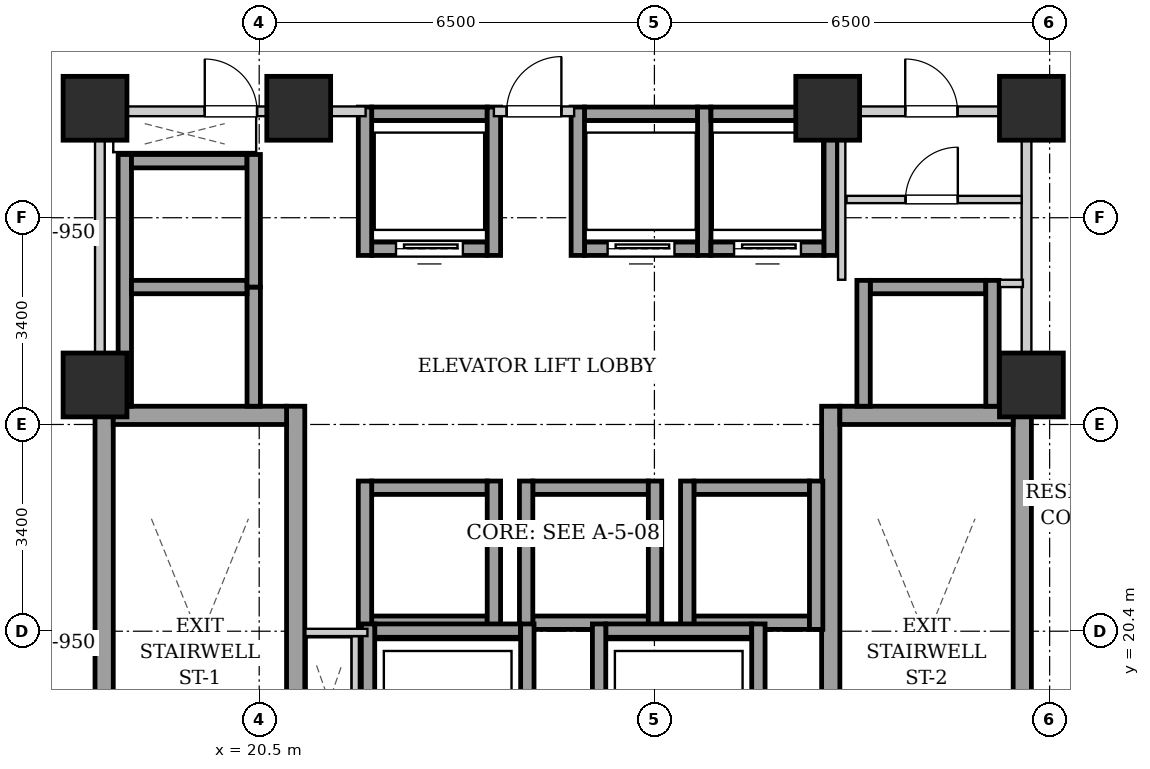
"""IFC4 building model, lengths in metres.
Left out: names, types, materials, properties, quantities, classifications, styles, units other than length and angle.
Written with IfcOpenShell. Run it as: python <this file> out.ifc"""

import sys

from ifc_helpers import new_model, si_unit, direction, frame, frame_2d, origin, origin_2d, place, context, subcontext, project, spatial, rectangle, extrude, element, fill, save


model = new_model("IFC4")
c1 = context("Model", 3, precision=1e-05, world=origin(), true_north=direction((0.0, 1.0)))
c2 = subcontext(c1, "Body", "Model", "MODEL_VIEW")
j1 = project(units=[si_unit("LENGTHUNIT", "METRE"), si_unit("PLANEANGLEUNIT", "RADIAN")], contexts=[c1])
p1 = place(None, origin())
s1 = spatial("IfcSite", under=j1, at=p1, CompositionType="ELEMENT")
p2 = place(p1, origin())
s2 = spatial("IfcBuilding", under=s1, at=p2, CompositionType="ELEMENT")
p3 = place(p2, frame((0.0, 0.0, 100.7)))
s3 = spatial("IfcBuildingStorey", under=s2, at=p3, CompositionType="ELEMENT", Elevation=100.7)
for number, where, z_axis, x_axis in (
    (1, (17.8, 29.0, 0.0), (0.0, 0.0, 1.0), (1.0, 0.0, 0.0)),
    (2, (21.15, 29.0, 0.0), (0.0, 0.0, 1.0), (1.0, 0.0, 0.0)),
    (3, (29.85, 29.0, 0.0), (0.0, 0.0, 1.0), (1.0, 0.0, 0.0)),
    (4, (33.2, 29.0, 0.0), (0.0, 0.0, 1.0), (1.0, 0.0, 0.0)),
    (5, (17.8, 24.45, 0.0), (0.0, 0.0, 1.0), (1.0, 0.0, 0.0)),
    (6, (33.2, 24.45, 0.0), (0.0, 0.0, 1.0), (1.0, 0.0, 0.0)),
):
    element("IfcColumn", number, at=place(p3, frame(where, z_axis=z_axis, x_axis=x_axis)), inside=s3, PredefinedType="COLUMN", context=c2, shape_type="SweptSolid", body=[
        extrude(rectangle(XDim=1.05, YDim=1.05, at=origin_2d()), origin(), (0.0, 0.0, 1.0), 3.2),
    ])
for number, where, z_axis, x_axis in (
    (7, (17.95, 15.1, 0.0), (0.0, 0.0, 1.0), (0.0, 1.0, 0.0)),
    (8, (21.1, 15.1, 0.0), (0.0, 0.0, 1.0), (0.0, 1.0, 0.0)),
):
    element("IfcWall", number, at=place(p3, frame(where, z_axis=z_axis, x_axis=x_axis)), inside=s3, PredefinedType="SHEAR", context=c2, shape_type="SweptSolid", body=[
        extrude(rectangle(XDim=9.0, YDim=0.3, at=frame_2d((4.5, 0.0))), origin(), (0.0, 0.0, 1.0), 2.94),
    ])
p4 = place(p3, frame((18.1, 23.95, 0.0), z_axis=(0.0, 0.0, 1.0), x_axis=(1.0, 0.0, 0.0)))
e9 = element("IfcWall", 9, at=p4, inside=s3, PredefinedType="SHEAR", context=c2, shape_type="SweptSolid", body=[
    extrude(rectangle(XDim=2.85, YDim=0.3, at=frame_2d((1.425, 0.0))), origin(), (0.0, 0.0, 1.0), 2.94),
])
for number, where, z_axis, x_axis in (
    (10, (29.9, 15.1, 0.0), (0.0, 0.0, 1.0), (0.0, 1.0, 0.0)),
    (11, (33.05, 15.1, 0.0), (0.0, 0.0, 1.0), (0.0, 1.0, 0.0)),
):
    element("IfcWall", number, at=place(p3, frame(where, z_axis=z_axis, x_axis=x_axis)), inside=s3, PredefinedType="SHEAR", context=c2, shape_type="SweptSolid", body=[
        extrude(rectangle(XDim=9.0, YDim=0.3, at=frame_2d((4.5, 0.0))), origin(), (0.0, 0.0, 1.0), 2.94),
    ])
p5 = place(p3, frame((30.05, 23.95, 0.0), z_axis=(0.0, 0.0, 1.0), x_axis=(1.0, 0.0, 0.0)))
e12 = element("IfcWall", 12, at=p5, inside=s3, PredefinedType="SHEAR", context=c2, shape_type="SweptSolid", body=[
    extrude(rectangle(XDim=2.85, YDim=0.3, at=frame_2d((1.425, 0.0))), origin(), (0.0, 0.0, 1.0), 2.94),
])
p6 = place(p3, frame((22.35, 26.69, 0.0), z_axis=(0.0, 0.0, 1.0), x_axis=(1.0, 0.0, 0.0)))
e13 = element("IfcWall", 13, at=p6, inside=s3, PredefinedType="SHEAR", context=c2, shape_type="SweptSolid", body=[
    extrude(rectangle(XDim=1.9, YDim=0.22, at=frame_2d((0.95, 0.0))), origin(), (0.0, 0.0, 1.0), 2.94),
])
p7 = place(p6, frame((0.4, 0.0, 0.0)))
e14 = element("IfcOpeningElement", 14, at=p7, cuts=e13, PredefinedType="OPENING", context=c2, shape_type="SweptSolid", body=[
    extrude(rectangle(XDim=1.1, YDim=2.15, at=frame_2d((0.55, 1.075))), frame((0.0, 0.12, 0.0), z_axis=(0.0, -1.0, 0.0), x_axis=(1.0, 0.0, 0.0)), (0.0, 0.0, 1.0), 0.24),
])
p8 = place(p3, frame((22.35, 28.91, 0.0), z_axis=(0.0, 0.0, 1.0), x_axis=(1.0, 0.0, 0.0)))
e15 = element("IfcWall", 15, at=p8, inside=s3, PredefinedType="SHEAR", context=c2, shape_type="SweptSolid", body=[
    extrude(rectangle(XDim=1.9, YDim=0.22, at=frame_2d((0.95, 0.0))), origin(), (0.0, 0.0, 1.0), 2.94),
])
for number, where, z_axis, x_axis in (
    (16, (22.24, 26.58, 0.0), (0.0, 0.0, 1.0), (0.0, 1.0, 0.0)),
    (17, (24.36, 26.58, 0.0), (0.0, 0.0, 1.0), (0.0, 1.0, 0.0)),
):
    element("IfcWall", number, at=place(p3, frame(where, z_axis=z_axis, x_axis=x_axis)), inside=s3, PredefinedType="SHEAR", context=c2, shape_type="SweptSolid", body=[
        extrude(rectangle(XDim=2.44, YDim=0.22, at=frame_2d((1.22, 0.0))), origin(), (0.0, 0.0, 1.0), 2.94),
    ])
p9 = place(p3, frame((25.85, 26.69, 0.0), z_axis=(0.0, 0.0, 1.0), x_axis=(1.0, 0.0, 0.0)))
e18 = element("IfcWall", 18, at=p9, inside=s3, PredefinedType="SHEAR", context=c2, shape_type="SweptSolid", body=[
    extrude(rectangle(XDim=1.86, YDim=0.22, at=frame_2d((0.93, 0.0))), origin(), (0.0, 0.0, 1.0), 2.94),
])
p10 = place(p9, frame((0.38, 0.0, 0.0)))
e19 = element("IfcOpeningElement", 19, at=p10, cuts=e18, PredefinedType="OPENING", context=c2, shape_type="SweptSolid", body=[
    extrude(rectangle(XDim=1.1, YDim=2.15, at=frame_2d((0.55, 1.075))), frame((0.0, 0.12, 0.0), z_axis=(0.0, -1.0, 0.0), x_axis=(1.0, 0.0, 0.0)), (0.0, 0.0, 1.0), 0.24),
])
p11 = place(p3, frame((25.85, 28.91, 0.0), z_axis=(0.0, 0.0, 1.0), x_axis=(1.0, 0.0, 0.0)))
e20 = element("IfcWall", 20, at=p11, inside=s3, PredefinedType="SHEAR", context=c2, shape_type="SweptSolid", body=[
    extrude(rectangle(XDim=1.86, YDim=0.22, at=frame_2d((0.93, 0.0))), origin(), (0.0, 0.0, 1.0), 2.94),
])
for number, where, z_axis, x_axis in (
    (21, (25.74, 26.58, 0.0), (0.0, 0.0, 1.0), (0.0, 1.0, 0.0)),
    (22, (27.82, 26.58, 0.0), (0.0, 0.0, 1.0), (0.0, 1.0, 0.0)),
):
    element("IfcWall", number, at=place(p3, frame(where, z_axis=z_axis, x_axis=x_axis)), inside=s3, PredefinedType="SHEAR", context=c2, shape_type="SweptSolid", body=[
        extrude(rectangle(XDim=2.44, YDim=0.22, at=frame_2d((1.22, 0.0))), origin(), (0.0, 0.0, 1.0), 2.94),
    ])
p12 = place(p3, frame((27.93, 26.69, 0.0), z_axis=(0.0, 0.0, 1.0), x_axis=(1.0, 0.0, 0.0)))
e23 = element("IfcWall", 23, at=p12, inside=s3, PredefinedType="SHEAR", context=c2, shape_type="SweptSolid", body=[
    extrude(rectangle(XDim=1.86, YDim=0.22, at=frame_2d((0.93, 0.0))), origin(), (0.0, 0.0, 1.0), 2.94),
])
p13 = place(p12, frame((0.38, 0.0, 0.0)))
e24 = element("IfcOpeningElement", 24, at=p13, cuts=e23, PredefinedType="OPENING", context=c2, shape_type="SweptSolid", body=[
    extrude(rectangle(XDim=1.1, YDim=2.15, at=frame_2d((0.55, 1.075))), frame((0.0, 0.12, 0.0), z_axis=(0.0, -1.0, 0.0), x_axis=(1.0, 0.0, 0.0)), (0.0, 0.0, 1.0), 0.24),
])
p14 = place(p3, frame((27.93, 28.91, 0.0), z_axis=(0.0, 0.0, 1.0), x_axis=(1.0, 0.0, 0.0)))
e25 = element("IfcWall", 25, at=p14, inside=s3, PredefinedType="SHEAR", context=c2, shape_type="SweptSolid", body=[
    extrude(rectangle(XDim=1.86, YDim=0.22, at=frame_2d((0.93, 0.0))), origin(), (0.0, 0.0, 1.0), 2.94),
])
p15 = place(p3, frame((29.9, 26.58, 0.0), z_axis=(0.0, 0.0, 1.0), x_axis=(0.0, 1.0, 0.0)))
e26 = element("IfcWall", 26, at=p15, inside=s3, PredefinedType="SHEAR", context=c2, shape_type="SweptSolid", body=[
    extrude(rectangle(XDim=2.44, YDim=0.22, at=frame_2d((1.22, 0.0))), origin(), (0.0, 0.0, 1.0), 2.94),
])
for number, where, z_axis, x_axis in (
    (27, (22.35, 20.54, 0.0), (0.0, 0.0, 1.0), (1.0, 0.0, 0.0)),
    (28, (22.35, 22.76, 0.0), (0.0, 0.0, 1.0), (1.0, 0.0, 0.0)),
):
    element("IfcWall", number, at=place(p3, frame(where, z_axis=z_axis, x_axis=x_axis)), inside=s3, PredefinedType="SHEAR", context=c2, shape_type="SweptSolid", body=[
        extrude(rectangle(XDim=1.9, YDim=0.22, at=frame_2d((0.95, 0.0))), origin(), (0.0, 0.0, 1.0), 2.94),
    ])
for number, where, z_axis, x_axis in (
    (29, (22.24, 20.43, 0.0), (0.0, 0.0, 1.0), (0.0, 1.0, 0.0)),
    (30, (24.36, 20.43, 0.0), (0.0, 0.0, 1.0), (0.0, 1.0, 0.0)),
):
    element("IfcWall", number, at=place(p3, frame(where, z_axis=z_axis, x_axis=x_axis)), inside=s3, PredefinedType="SHEAR", context=c2, shape_type="SweptSolid", body=[
        extrude(rectangle(XDim=2.44, YDim=0.22, at=frame_2d((1.22, 0.0))), origin(), (0.0, 0.0, 1.0), 2.94),
    ])
for number, where, z_axis, x_axis in (
    (31, (25.0, 20.54, 0.0), (0.0, 0.0, 1.0), (1.0, 0.0, 0.0)),
    (32, (25.0, 22.76, 0.0), (0.0, 0.0, 1.0), (1.0, 0.0, 0.0)),
):
    element("IfcWall", number, at=place(p3, frame(where, z_axis=z_axis, x_axis=x_axis)), inside=s3, PredefinedType="SHEAR", context=c2, shape_type="SweptSolid", body=[
        extrude(rectangle(XDim=1.9, YDim=0.22, at=frame_2d((0.95, 0.0))), origin(), (0.0, 0.0, 1.0), 2.94),
    ])
for number, where, z_axis, x_axis in (
    (33, (24.89, 20.43, 0.0), (0.0, 0.0, 1.0), (0.0, 1.0, 0.0)),
    (34, (27.01, 20.43, 0.0), (0.0, 0.0, 1.0), (0.0, 1.0, 0.0)),
):
    element("IfcWall", number, at=place(p3, frame(where, z_axis=z_axis, x_axis=x_axis)), inside=s3, PredefinedType="SHEAR", context=c2, shape_type="SweptSolid", body=[
        extrude(rectangle(XDim=2.44, YDim=0.22, at=frame_2d((1.22, 0.0))), origin(), (0.0, 0.0, 1.0), 2.94),
    ])
for number, where, z_axis, x_axis in (
    (35, (27.65, 20.54, 0.0), (0.0, 0.0, 1.0), (1.0, 0.0, 0.0)),
    (36, (27.65, 22.76, 0.0), (0.0, 0.0, 1.0), (1.0, 0.0, 0.0)),
):
    element("IfcWall", number, at=place(p3, frame(where, z_axis=z_axis, x_axis=x_axis)), inside=s3, PredefinedType="SHEAR", context=c2, shape_type="SweptSolid", body=[
        extrude(rectangle(XDim=1.9, YDim=0.22, at=frame_2d((0.95, 0.0))), origin(), (0.0, 0.0, 1.0), 2.94),
    ])
for number, where, z_axis, x_axis in (
    (37, (27.54, 20.43, 0.0), (0.0, 0.0, 1.0), (0.0, 1.0, 0.0)),
    (38, (29.66, 20.43, 0.0), (0.0, 0.0, 1.0), (0.0, 1.0, 0.0)),
):
    element("IfcWall", number, at=place(p3, frame(where, z_axis=z_axis, x_axis=x_axis)), inside=s3, PredefinedType="SHEAR", context=c2, shape_type="SweptSolid", body=[
        extrude(rectangle(XDim=2.44, YDim=0.22, at=frame_2d((1.22, 0.0))), origin(), (0.0, 0.0, 1.0), 2.94),
    ])
p16 = place(p3, frame((18.29, 24.1, 0.0), z_axis=(0.0, 0.0, 1.0), x_axis=(0.0, 1.0, 0.0)))
e39 = element("IfcWall", 39, at=p16, inside=s3, PredefinedType="SHEAR", context=c2, shape_type="SweptSolid", body=[
    extrude(rectangle(XDim=4.14, YDim=0.22, at=frame_2d((2.07, 0.0))), origin(), (0.0, 0.0, 1.0), 2.94),
])
p17 = place(p3, frame((20.41, 24.1, 0.0), z_axis=(0.0, 0.0, 1.0), x_axis=(0.0, 1.0, 0.0)))
e40 = element("IfcWall", 40, at=p17, inside=s3, PredefinedType="SHEAR", context=c2, shape_type="SweptSolid", body=[
    extrude(rectangle(XDim=1.96, YDim=0.22, at=frame_2d((0.98, 0.0))), origin(), (0.0, 0.0, 1.0), 2.94),
])
for number, where, z_axis, x_axis in (
    (41, (18.4, 26.06, 0.0), (0.0, 0.0, 1.0), (1.0, 0.0, 0.0)),
    (42, (18.4, 28.13, 0.0), (0.0, 0.0, 1.0), (1.0, 0.0, 0.0)),
):
    element("IfcWall", number, at=place(p3, frame(where, z_axis=z_axis, x_axis=x_axis)), inside=s3, PredefinedType="SHEAR", context=c2, shape_type="SweptSolid", body=[
        extrude(rectangle(XDim=1.9, YDim=0.22, at=frame_2d((0.95, 0.0))), origin(), (0.0, 0.0, 1.0), 2.94),
    ])
p18 = place(p3, frame((20.41, 26.06, 0.0), z_axis=(0.0, 0.0, 1.0), x_axis=(0.0, 1.0, 0.0)))
e43 = element("IfcWall", 43, at=p18, inside=s3, PredefinedType="SHEAR", context=c2, shape_type="SweptSolid", body=[
    extrude(rectangle(XDim=2.18, YDim=0.22, at=frame_2d((1.09, 0.0))), origin(), (0.0, 0.0, 1.0), 2.94),
])
p19 = place(p3, frame((30.55, 26.06, 0.0), z_axis=(0.0, 0.0, 1.0), x_axis=(1.0, 0.0, 0.0)))
e44 = element("IfcWall", 44, at=p19, inside=s3, PredefinedType="SHEAR", context=c2, shape_type="SweptSolid", body=[
    extrude(rectangle(XDim=1.9, YDim=0.22, at=frame_2d((0.95, 0.0))), origin(), (0.0, 0.0, 1.0), 2.94),
])
for number, where, z_axis, x_axis in (
    (45, (30.44, 24.1, 0.0), (0.0, 0.0, 1.0), (0.0, 1.0, 0.0)),
    (46, (32.56, 24.1, 0.0), (0.0, 0.0, 1.0), (0.0, 1.0, 0.0)),
):
    element("IfcWall", number, at=place(p3, frame(where, z_axis=z_axis, x_axis=x_axis)), inside=s3, PredefinedType="SHEAR", context=c2, shape_type="SweptSolid", body=[
        extrude(rectangle(XDim=2.07, YDim=0.22, at=frame_2d((1.035, 0.0))), origin(), (0.0, 0.0, 1.0), 2.94),
    ])
p20 = place(p3, frame((22.4, 20.41, 0.0), z_axis=(0.0, 0.0, 1.0), x_axis=(1.0, 0.0, 0.0)))
e47 = element("IfcWall", 47, at=p20, inside=s3, PredefinedType="SHEAR", context=c2, shape_type="SweptSolid", body=[
    extrude(rectangle(XDim=2.4, YDim=0.22, at=frame_2d((1.2, 0.0))), origin(), (0.0, 0.0, 1.0), 2.94),
])
for number, where, z_axis, x_axis in (
    (48, (22.29, 17.98, 0.0), (0.0, 0.0, 1.0), (0.0, 1.0, 0.0)),
    (49, (24.91, 17.98, 0.0), (0.0, 0.0, 1.0), (0.0, 1.0, 0.0)),
):
    element("IfcWall", number, at=place(p3, frame(where, z_axis=z_axis, x_axis=x_axis)), inside=s3, PredefinedType="SHEAR", context=c2, shape_type="SweptSolid", body=[
        extrude(rectangle(XDim=2.54, YDim=0.22, at=frame_2d((1.27, 0.0))), origin(), (0.0, 0.0, 1.0), 2.94),
    ])
p21 = place(p3, frame((26.2, 20.41, 0.0), z_axis=(0.0, 0.0, 1.0), x_axis=(1.0, 0.0, 0.0)))
e50 = element("IfcWall", 50, at=p21, inside=s3, PredefinedType="SHEAR", context=c2, shape_type="SweptSolid", body=[
    extrude(rectangle(XDim=2.4, YDim=0.22, at=frame_2d((1.2, 0.0))), origin(), (0.0, 0.0, 1.0), 2.94),
])
for number, where, z_axis, x_axis in (
    (51, (26.09, 17.98, 0.0), (0.0, 0.0, 1.0), (0.0, 1.0, 0.0)),
    (52, (28.71, 17.98, 0.0), (0.0, 0.0, 1.0), (0.0, 1.0, 0.0)),
):
    element("IfcWall", number, at=place(p3, frame(where, z_axis=z_axis, x_axis=x_axis)), inside=s3, PredefinedType="SHEAR", context=c2, shape_type="SweptSolid", body=[
        extrude(rectangle(XDim=2.54, YDim=0.22, at=frame_2d((1.27, 0.0))), origin(), (0.0, 0.0, 1.0), 2.94),
    ])
for number, where, z_axis, x_axis in (
    (53, (17.88, 24.12, 0.0), (0.0, 0.0, 1.0), (0.0, 1.0, 0.0)),
    (54, (33.12, 24.12, 0.0), (0.0, 0.0, 1.0), (0.0, 1.0, 0.0)),
):
    element("IfcWall", number, at=place(p3, frame(where, z_axis=z_axis, x_axis=x_axis)), inside=s3, PredefinedType="PARTITIONING", context=c2, shape_type="SweptSolid", body=[
        extrude(rectangle(XDim=4.76, YDim=0.16, at=frame_2d((2.38, 0.0))), origin(), (0.0, 0.0, 1.0), 2.94),
    ])
p22 = place(p3, frame((24.36, 28.95, 0.0), z_axis=(0.0, 0.0, 1.0), x_axis=(1.0, 0.0, 0.0)))
e55 = element("IfcWall", 55, at=p22, inside=s3, PredefinedType="PARTITIONING", context=c2, shape_type="SweptSolid", body=[
    extrude(rectangle(XDim=1.32, YDim=0.16, at=frame_2d((0.66, 0.0))), origin(), (0.0, 0.0, 1.0), 2.313),
])
p23 = place(p22, frame((0.21, 0.0, 0.0)))
e56 = element("IfcOpeningElement", 56, at=p23, cuts=e55, PredefinedType="OPENING", context=c2, shape_type="SweptSolid", body=[
    extrude(rectangle(XDim=0.9, YDim=2.05, at=frame_2d((0.45, 1.025))), frame((0.0, 0.09, 0.0), z_axis=(0.0, -1.0, 0.0), x_axis=(1.0, 0.0, 0.0)), (0.0, 0.0, 1.0), 0.18),
])
p24 = place(p3, frame((17.96, 28.95, 0.0), z_axis=(0.0, 0.0, 1.0), x_axis=(1.0, 0.0, 0.0)))
e57 = element("IfcWall", 57, at=p24, inside=s3, PredefinedType="PARTITIONING", context=c2, shape_type="SweptSolid", body=[
    extrude(rectangle(XDim=4.29, YDim=0.16, at=frame_2d((2.145, 0.0))), origin(), (0.0, 0.0, 1.0), 2.313),
])
p25 = place(p24, frame((1.645, 0.0, 0.0)))
e58 = element("IfcOpeningElement", 58, at=p25, cuts=e57, PredefinedType="OPENING", context=c2, shape_type="SweptSolid", body=[
    extrude(rectangle(XDim=0.86, YDim=2.05, at=frame_2d((0.43, 1.025))), frame((0.0, 0.09, 0.0), z_axis=(0.0, -1.0, 0.0), x_axis=(1.0, 0.0, 0.0)), (0.0, 0.0, 1.0), 0.18),
])
p26 = place(p3, frame((22.08, 18.2, 0.0), z_axis=(0.0, 0.0, 1.0), x_axis=(0.0, 1.0, 0.0)))
e59 = element("IfcWall", 59, at=p26, inside=s3, PredefinedType="PARTITIONING", context=c2, shape_type="SweptSolid", body=[
    extrude(rectangle(XDim=2.12, YDim=0.12, at=frame_2d((1.06, 0.0))), origin(), (0.0, 0.0, 1.0), 2.94),
])
p27 = place(p3, frame((22.28, 20.38, 0.0), z_axis=(0.0, 0.0, 1.0), x_axis=(-1.0, 0.0, 0.0)))
e60 = element("IfcWall", 60, at=p27, inside=s3, PredefinedType="PARTITIONING", context=c2, shape_type="SweptSolid", body=[
    extrude(rectangle(XDim=1.02, YDim=0.12, at=frame_2d((0.51, 0.0))), origin(), (0.0, 0.0, 1.0), 2.94),
])
p28 = place(p3, frame((30.08, 26.18, 0.0), z_axis=(0.0, 0.0, 1.0), x_axis=(0.0, 1.0, 0.0)))
e61 = element("IfcWall", 61, at=p28, inside=s3, PredefinedType="PARTITIONING", context=c2, shape_type="SweptSolid", body=[
    extrude(rectangle(XDim=2.68, YDim=0.12, at=frame_2d((1.34, 0.0))), origin(), (0.0, 0.0, 1.0), 2.94),
])
p29 = place(p3, frame((32.68, 26.12, 0.0), z_axis=(0.0, 0.0, 1.0), x_axis=(1.0, 0.0, 0.0)))
e62 = element("IfcWall", 62, at=p29, inside=s3, PredefinedType="PARTITIONING", context=c2, shape_type="SweptSolid", body=[
    extrude(rectangle(XDim=0.38, YDim=0.12, at=frame_2d((0.19, 0.0))), origin(), (0.0, 0.0, 1.0), 2.94),
])
p30 = place(p3, frame((30.16, 27.5, 0.0), z_axis=(0.0, 0.0, 1.0), x_axis=(1.0, 0.0, 0.0)))
e63 = element("IfcWall", 63, at=p30, inside=s3, PredefinedType="PARTITIONING", context=c2, shape_type="SweptSolid", body=[
    extrude(rectangle(XDim=2.88, YDim=0.12, at=frame_2d((1.44, 0.0))), origin(), (0.0, 0.0, 1.0), 2.94),
])
p31 = place(p30, frame((0.97, 0.0, 0.0)))
e64 = element("IfcOpeningElement", 64, at=p31, cuts=e63, PredefinedType="OPENING", context=c2, shape_type="SweptSolid", body=[
    extrude(rectangle(XDim=0.86, YDim=2.05, at=frame_2d((0.43, 1.025))), frame((0.0, 0.07, 0.0), z_axis=(0.0, -1.0, 0.0), x_axis=(1.0, 0.0, 0.0)), (0.0, 0.0, 1.0), 0.14),
])
p32 = place(p3, frame((30.08, 28.95, 0.0), z_axis=(0.0, 0.0, 1.0), x_axis=(1.0, 0.0, 0.0)))
e65 = element("IfcWall", 65, at=p32, inside=s3, PredefinedType="PARTITIONING", context=c2, shape_type="SweptSolid", body=[
    extrude(rectangle(XDim=2.96, YDim=0.16, at=frame_2d((1.48, 0.0))), origin(), (0.0, 0.0, 1.0), 2.94),
])
p33 = place(p32, frame((1.045, 0.0, 0.0)))
e66 = element("IfcOpeningElement", 66, at=p33, cuts=e65, PredefinedType="OPENING", context=c2, shape_type="SweptSolid", body=[
    extrude(rectangle(XDim=0.86, YDim=2.05, at=frame_2d((0.43, 1.025))), frame((0.0, 0.09, 0.0), z_axis=(0.0, -1.0, 0.0), x_axis=(1.0, 0.0, 0.0)), (0.0, 0.0, 1.0), 0.18),
])
p34 = place(p7, origin())
e67 = element("IfcDoor", 67, at=p34, inside=s3, OperationType="SLIDING_TO_LEFT", PredefinedType="DOOR", context=c2, shape_type="SweptSolid", body=[
    extrude(rectangle(XDim=1.1, YDim=2.15, at=frame_2d((0.55, 1.075))), frame((0.0, 0.025, 0.0), z_axis=(0.0, -1.0, 0.0), x_axis=(1.0, 0.0, 0.0)), (0.0, 0.0, 1.0), 0.05),
])
fill(e14, e67)
p35 = place(p10, origin())
e68 = element("IfcDoor", 68, at=p35, inside=s3, OperationType="SLIDING_TO_LEFT", PredefinedType="DOOR", context=c2, shape_type="SweptSolid", body=[
    extrude(rectangle(XDim=1.1, YDim=2.15, at=frame_2d((0.55, 1.075))), frame((0.0, 0.025, 0.0), z_axis=(0.0, -1.0, 0.0), x_axis=(1.0, 0.0, 0.0)), (0.0, 0.0, 1.0), 0.05),
])
fill(e19, e68)
p36 = place(p13, origin())
e69 = element("IfcDoor", 69, at=p36, inside=s3, OperationType="SLIDING_TO_LEFT", PredefinedType="DOOR", context=c2, shape_type="SweptSolid", body=[
    extrude(rectangle(XDim=1.1, YDim=2.15, at=frame_2d((0.55, 1.075))), frame((0.0, 0.025, 0.0), z_axis=(0.0, -1.0, 0.0), x_axis=(1.0, 0.0, 0.0)), (0.0, 0.0, 1.0), 0.05),
])
fill(e24, e69)
p37 = place(p23, origin())
e70 = element("IfcDoor", 70, at=p37, inside=s3, OperationType="SINGLE_SWING_RIGHT", PredefinedType="DOOR", context=c2, shape_type="SweptSolid", body=[
    extrude(rectangle(XDim=0.9, YDim=2.05, at=frame_2d((0.45, 1.025))), frame((0.0, 0.025, 0.0), z_axis=(0.0, -1.0, 0.0), x_axis=(1.0, 0.0, 0.0)), (0.0, 0.0, 1.0), 0.05),
])
fill(e56, e70)
p38 = place(p25, origin())
e71 = element("IfcDoor", 71, at=p38, inside=s3, OperationType="SINGLE_SWING_LEFT", PredefinedType="DOOR", context=c2, shape_type="SweptSolid", body=[
    extrude(rectangle(XDim=0.86, YDim=2.05, at=frame_2d((0.43, 1.025))), frame((0.0, 0.025, 0.0), z_axis=(0.0, -1.0, 0.0), x_axis=(1.0, 0.0, 0.0)), (0.0, 0.0, 1.0), 0.05),
])
fill(e58, e71)
p39 = place(p31, origin())
e72 = element("IfcDoor", 72, at=p39, inside=s3, OperationType="SINGLE_SWING_RIGHT", PredefinedType="DOOR", context=c2, shape_type="SweptSolid", body=[
    extrude(rectangle(XDim=0.86, YDim=2.05, at=frame_2d((0.43, 1.025))), frame((0.0, 0.025, 0.0), z_axis=(0.0, -1.0, 0.0), x_axis=(1.0, 0.0, 0.0)), (0.0, 0.0, 1.0), 0.05),
])
fill(e64, e72)
p40 = place(p33, origin())
e73 = element("IfcDoor", 73, at=p40, inside=s3, OperationType="SINGLE_SWING_LEFT", PredefinedType="DOOR", context=c2, shape_type="SweptSolid", body=[
    extrude(rectangle(XDim=0.86, YDim=2.05, at=frame_2d((0.43, 1.025))), frame((0.0, 0.025, 0.0), z_axis=(0.0, -1.0, 0.0), x_axis=(1.0, 0.0, 0.0)), (0.0, 0.0, 1.0), 0.05),
])
fill(e66, e73)
save(model, sys.argv[1])
